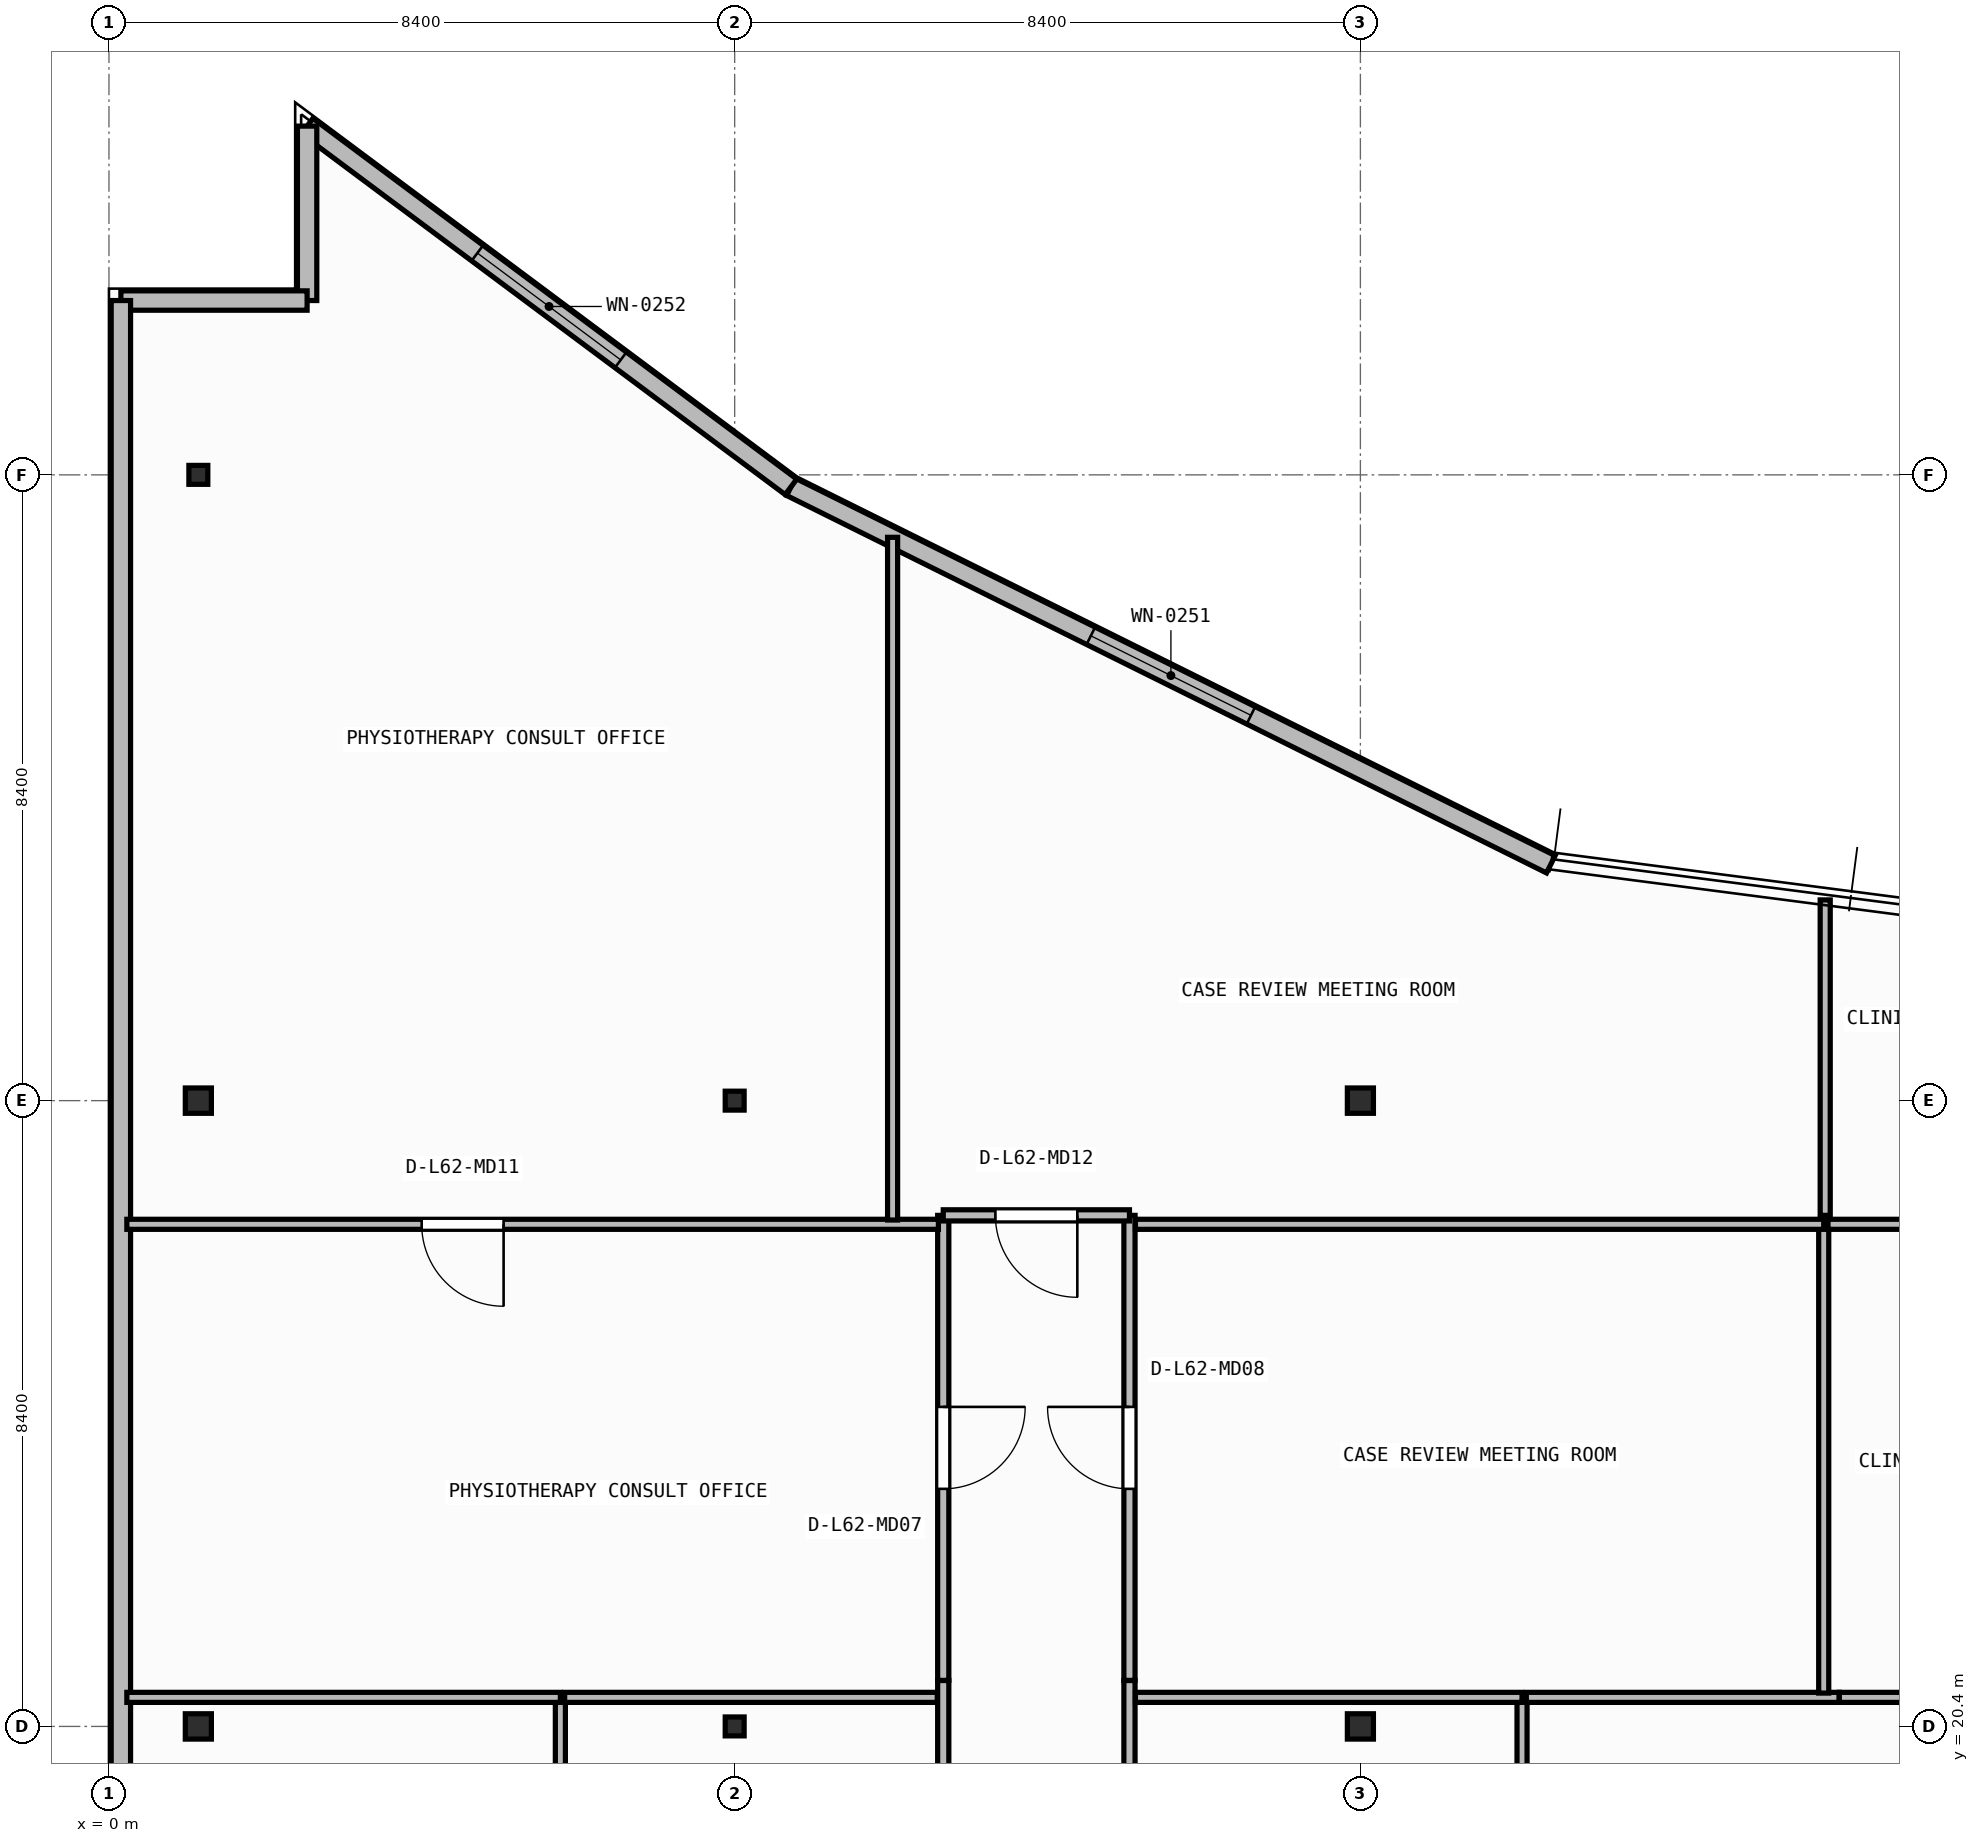
"""IFC4 building model, lengths in metres.
Left out: names, types, materials, properties, quantities, classifications, styles, units other than length and angle.
Written with IfcOpenShell. Run it as: python <this file> out.ifc"""

import sys

from ifc_helpers import new_model, si_unit, direction, frame, frame_2d, origin, origin_2d, place, context, subcontext, project, spatial, rectangle, i_section, extrude, element, fill, save


model = new_model("IFC4")
c1 = context("Model", 3, precision=1e-05, world=origin(), true_north=direction((0.0, 1.0)))
c2 = subcontext(c1, "Body", "Model", "MODEL_VIEW")
j1 = project(units=[si_unit("LENGTHUNIT", "METRE"), si_unit("PLANEANGLEUNIT", "RADIAN")], contexts=[c1])
p1 = place(None, origin())
s1 = spatial("IfcSite", under=j1, at=p1, CompositionType="ELEMENT")
p2 = place(p1, origin())
s2 = spatial("IfcBuilding", under=s1, at=p2, CompositionType="ELEMENT")
p3 = place(p2, frame((0.0, 0.0, 252.6)))
s3 = spatial("IfcBuildingStorey", under=s2, at=p3, CompositionType="ELEMENT", Elevation=252.6)
p4 = place(p3, frame((1.2, 20.4, 0.0), z_axis=(0.0, 0.0, 1.0), x_axis=(1.0, 0.0, 0.0)))
e1 = element("IfcColumn", 1, at=p4, inside=s3, PredefinedType="COLUMN", context=c2, shape_type="SweptSolid", body=[
    extrude(i_section(OverallWidth=0.35, OverallDepth=0.34, WebThickness=0.016, FlangeThickness=0.028, at=origin_2d()), origin(), (0.0, 0.0, 1.0), 3.95),
])
p5 = place(p3, frame((8.4, 20.4, 0.0), z_axis=(0.0, 0.0, 1.0), x_axis=(1.0, 0.0, 0.0)))
e2 = element("IfcColumn", 2, at=p5, inside=s3, PredefinedType="COLUMN", context=c2, shape_type="SweptSolid", body=[
    extrude(i_section(OverallWidth=0.254, OverallDepth=0.254, WebThickness=0.009, FlangeThickness=0.014, FilletRadius=0.013, at=origin_2d()), origin(), (0.0, 0.0, 1.0), 3.95),
])
for number, where, z_axis, x_axis in (
    (3, (16.8, 20.4, 0.0), (0.0, 0.0, 1.0), (1.0, 0.0, 0.0)),
    (4, (1.2, 28.8, 0.0), (0.0, 0.0, 1.0), (1.0, 0.0, 0.0)),
):
    element("IfcColumn", number, at=place(p3, frame(where, z_axis=z_axis, x_axis=x_axis)), inside=s3, PredefinedType="COLUMN", context=c2, shape_type="SweptSolid", body=[
        extrude(i_section(OverallWidth=0.35, OverallDepth=0.34, WebThickness=0.016, FlangeThickness=0.028, at=origin_2d()), origin(), (0.0, 0.0, 1.0), 3.95),
    ])
p6 = place(p3, frame((8.4, 28.8, 0.0), z_axis=(0.0, 0.0, 1.0), x_axis=(1.0, 0.0, 0.0)))
e5 = element("IfcColumn", 5, at=p6, inside=s3, PredefinedType="COLUMN", context=c2, shape_type="SweptSolid", body=[
    extrude(i_section(OverallWidth=0.254, OverallDepth=0.254, WebThickness=0.009, FlangeThickness=0.014, FilletRadius=0.013, at=origin_2d()), origin(), (0.0, 0.0, 1.0), 3.95),
])
p7 = place(p3, frame((16.8, 28.8, 0.0), z_axis=(0.0, 0.0, 1.0), x_axis=(1.0, 0.0, 0.0)))
e6 = element("IfcColumn", 6, at=p7, inside=s3, PredefinedType="COLUMN", context=c2, shape_type="SweptSolid", body=[
    extrude(i_section(OverallWidth=0.35, OverallDepth=0.34, WebThickness=0.016, FlangeThickness=0.028, at=origin_2d()), origin(), (0.0, 0.0, 1.0), 3.95),
])
p8 = place(p3, frame((1.2, 37.2, 0.0), z_axis=(0.0, 0.0, 1.0), x_axis=(1.0, 0.0, 0.0)))
e7 = element("IfcColumn", 7, at=p8, inside=s3, PredefinedType="COLUMN", context=c2, shape_type="SweptSolid", body=[
    extrude(i_section(OverallWidth=0.254, OverallDepth=0.254, WebThickness=0.009, FlangeThickness=0.014, FilletRadius=0.013, at=origin_2d()), origin(), (0.0, 0.0, 1.0), 3.95),
])
p9 = place(p3, frame((19.357, 31.973, 0.0), z_axis=(0.0, 0.0, 1.0), x_axis=(-0.895624365378, 0.444811191565, 0.0)))
e8 = element("IfcWall", 8, at=p9, inside=s3, PredefinedType="STANDARD", context=c2, shape_type="SweptSolid", body=[
    extrude(rectangle(XDim=11.389, YDim=0.26, at=frame_2d((5.695, 0.0))), origin(), (0.0, 0.0, 1.0), 3.71),
])
p10 = place(p9, frame((4.495, 0.0, 0.9)))
e9 = element("IfcOpeningElement", 9, at=p10, cuts=e8, PredefinedType="OPENING", context=c2, shape_type="SweptSolid", body=[
    extrude(rectangle(XDim=2.4, YDim=1.65, at=frame_2d((1.2, 0.825))), frame((0.0, 0.14, 0.0), z_axis=(0.0, -1.0, 0.0), x_axis=(1.0, 0.0, 0.0)), (0.0, 0.0, 1.0), 0.28),
])
p11 = place(p3, frame((9.156, 37.039, 0.0), z_axis=(0.0, 0.0, 1.0), x_axis=(-0.801775528243, 0.597625302602, 0.0)))
e10 = element("IfcWall", 10, at=p11, inside=s3, PredefinedType="STANDARD", context=c2, shape_type="SweptSolid", body=[
    extrude(rectangle(XDim=8.102, YDim=0.26, at=frame_2d((4.051, 0.0))), origin(), (0.0, 0.0, 1.0), 3.71),
])
p12 = place(p11, frame((2.851, 0.0, 0.9)))
e11 = element("IfcOpeningElement", 11, at=p12, cuts=e10, PredefinedType="OPENING", context=c2, shape_type="SweptSolid", body=[
    extrude(rectangle(XDim=2.4, YDim=1.65, at=frame_2d((1.2, 0.825))), frame((0.0, 0.14, 0.0), z_axis=(0.0, -1.0, 0.0), x_axis=(1.0, 0.0, 0.0)), (0.0, 0.0, 1.0), 0.28),
])
p13 = place(p3, frame((2.66, 41.881, 0.0), z_axis=(0.0, 0.0, 1.0), x_axis=(0.0, -1.0, 0.0)))
e12 = element("IfcWall", 12, at=p13, inside=s3, PredefinedType="STANDARD", context=c2, shape_type="SweptSolid", body=[
    extrude(rectangle(XDim=2.341, YDim=0.26, at=frame_2d((1.17, 0.0))), origin(), (0.0, 0.0, 1.0), 3.71),
])
p14 = place(p3, frame((2.66, 39.54, 0.0), z_axis=(0.0, 0.0, 1.0), x_axis=(-1.0, 0.0, 0.0)))
e13 = element("IfcWall", 13, at=p14, inside=s3, PredefinedType="STANDARD", context=c2, shape_type="SweptSolid", body=[
    extrude(rectangle(XDim=2.5, YDim=0.26, at=frame_2d((1.25, 0.0))), origin(), (0.0, 0.0, 1.0), 3.71),
])
p15 = place(p3, frame((0.16, 39.54, 0.0), z_axis=(0.0, 0.0, 1.0), x_axis=(0.0, -1.0, 0.0)))
e14 = element("IfcWall", 14, at=p15, inside=s3, PredefinedType="STANDARD", context=c2, shape_type="SweptSolid", body=[
    extrude(rectangle(XDim=36.88, YDim=0.26, at=frame_2d((18.44, 0.0))), origin(), (0.0, 0.0, 1.0), 3.71),
])
p16 = place(p15, frame((26.625, 0.0, 0.9)))
e15 = element("IfcOpeningElement", 15, at=p16, cuts=e14, PredefinedType="OPENING", context=c2, shape_type="SweptSolid", body=[
    extrude(rectangle(XDim=2.4, YDim=1.65, at=frame_2d((1.2, 0.825))), frame((0.0, 0.14, 0.0), z_axis=(0.0, -1.0, 0.0), x_axis=(1.0, 0.0, 0.0)), (0.0, 0.0, 1.0), 0.28),
])
for number, where, z_axis, x_axis in (
    (16, (11.2, 21.016, 0.0), (0.0, 0.0, 1.0), (0.0, -1.0, 0.0)),
    (17, (13.7, 14.7, 0.0), (0.0, 0.0, 1.0), (0.0, 1.0, 0.0)),
):
    element("IfcWall", number, at=place(p3, frame(where, z_axis=z_axis, x_axis=x_axis)), inside=s3, PredefinedType="PARTITIONING", context=c2, shape_type="SweptSolid", body=[
        extrude(rectangle(XDim=6.316, YDim=0.15, at=frame_2d((3.158, 0.0))), origin(), (0.0, 0.0, 1.0), 3.71),
    ])
p17 = place(p3, frame((11.2, 27.26, 0.0), z_axis=(0.0, 0.0, 1.0), x_axis=(0.0, -1.0, 0.0)))
e18 = element("IfcWall", 18, at=p17, inside=s3, PredefinedType="PARTITIONING", context=c2, shape_type="SweptSolid", body=[
    extrude(rectangle(XDim=6.242, YDim=0.15, at=frame_2d((3.121, 0.0))), origin(), (0.0, 0.0, 1.0), 3.71),
])
p18 = place(p17, frame((2.571, 0.0, 0.0)))
e19 = element("IfcOpeningElement", 19, at=p18, cuts=e18, PredefinedType="OPENING", context=c2, shape_type="SweptSolid", body=[
    extrude(rectangle(XDim=1.1, YDim=2.1, at=frame_2d((0.55, 1.05))), frame((0.0, 0.085, 0.0), z_axis=(0.0, -1.0, 0.0), x_axis=(1.0, 0.0, 0.0)), (0.0, 0.0, 1.0), 0.17),
])
p19 = place(p3, frame((13.7, 21.018, 0.0), z_axis=(0.0, 0.0, 1.0), x_axis=(0.0, 1.0, 0.0)))
e20 = element("IfcWall", 20, at=p19, inside=s3, PredefinedType="PARTITIONING", context=c2, shape_type="SweptSolid", body=[
    extrude(rectangle(XDim=6.242, YDim=0.15, at=frame_2d((3.121, 0.0))), origin(), (0.0, 0.0, 1.0), 3.71),
])
p20 = place(p19, frame((2.571, 0.0, 0.0)))
e21 = element("IfcOpeningElement", 21, at=p20, cuts=e20, PredefinedType="OPENING", context=c2, shape_type="SweptSolid", body=[
    extrude(rectangle(XDim=1.1, YDim=2.1, at=frame_2d((0.55, 1.05))), frame((0.0, 0.085, 0.0), z_axis=(0.0, -1.0, 0.0), x_axis=(1.0, 0.0, 0.0)), (0.0, 0.0, 1.0), 0.17),
])
p21 = place(p3, frame((13.7, 27.26, 0.0), z_axis=(0.0, 0.0, 1.0), x_axis=(-1.0, 0.0, 0.0)))
e22 = element("IfcWall", 22, at=p21, inside=s3, PredefinedType="PARTITIONING", context=c2, shape_type="SweptSolid", body=[
    extrude(rectangle(XDim=2.5, YDim=0.15, at=frame_2d((1.25, 0.0))), origin(), (0.0, 0.0, 1.0), 3.71),
])
p22 = place(p21, frame((0.7, 0.0, 0.0)))
e23 = element("IfcOpeningElement", 23, at=p22, cuts=e22, PredefinedType="OPENING", context=c2, shape_type="SweptSolid", body=[
    extrude(rectangle(XDim=1.1, YDim=2.1, at=frame_2d((0.55, 1.05))), frame((0.0, 0.085, 0.0), z_axis=(0.0, -1.0, 0.0), x_axis=(1.0, 0.0, 0.0)), (0.0, 0.0, 1.0), 0.17),
])
p23 = place(p3, frame((6.06, 17.14, 0.0), z_axis=(0.0, 0.0, 1.0), x_axis=(0.0, 1.0, 0.0)))
e24 = element("IfcWall", 24, at=p23, inside=s3, PredefinedType="PARTITIONING", context=c2, shape_type="SweptSolid", body=[
    extrude(rectangle(XDim=3.65, YDim=0.135, at=frame_2d((1.825, 0.0))), origin(), (0.0, 0.0, 1.0), 3.71),
])
p24 = place(p3, frame((6.06, 20.79, 0.0), z_axis=(0.0, 0.0, 1.0), x_axis=(-1.0, 0.0, 0.0)))
e25 = element("IfcWall", 25, at=p24, inside=s3, PredefinedType="PARTITIONING", context=c2, shape_type="SweptSolid", body=[
    extrude(rectangle(XDim=5.82, YDim=0.135, at=frame_2d((2.91, 0.0))), origin(), (0.0, 0.0, 1.0), 3.157),
])
p25 = place(p3, frame((11.12, 20.79, 0.0), z_axis=(0.0, 0.0, 1.0), x_axis=(-1.0, 0.0, 0.0)))
e26 = element("IfcWall", 26, at=p25, inside=s3, PredefinedType="PARTITIONING", context=c2, shape_type="SweptSolid", body=[
    extrude(rectangle(XDim=5.003, YDim=0.135, at=frame_2d((2.501, 0.0))), origin(), (0.0, 0.0, 1.0), 3.157),
])
p26 = place(p3, frame((18.97, 14.76, 0.0), z_axis=(0.0, 0.0, 1.0), x_axis=(0.0, 1.0, 0.0)))
e27 = element("IfcWall", 27, at=p26, inside=s3, PredefinedType="PARTITIONING", context=c2, shape_type="SweptSolid", body=[
    extrude(rectangle(XDim=6.03, YDim=0.135, at=frame_2d((3.015, 0.0))), origin(), (0.0, 0.0, 1.0), 3.71),
])
p27 = place(p3, frame((18.97, 20.79, 0.0), z_axis=(0.0, 0.0, 1.0), x_axis=(-1.0, 0.0, 0.0)))
e28 = element("IfcWall", 28, at=p27, inside=s3, PredefinedType="PARTITIONING", context=c2, shape_type="SweptSolid", body=[
    extrude(rectangle(XDim=5.19, YDim=0.135, at=frame_2d((2.595, 0.0))), origin(), (0.0, 0.0, 1.0), 3.157),
])
p28 = place(p3, frame((23.228, 20.79, 0.0), z_axis=(0.0, 0.0, 1.0), x_axis=(-1.0, 0.0, 0.0)))
e29 = element("IfcWall", 29, at=p28, inside=s3, PredefinedType="PARTITIONING", context=c2, shape_type="SweptSolid", body=[
    extrude(rectangle(XDim=4.2, YDim=0.135, at=frame_2d((2.1, 0.0))), origin(), (0.0, 0.0, 1.0), 3.157),
])
p29 = place(p3, frame((25.76, 20.79, 0.0), z_axis=(0.0, 0.0, 1.0), x_axis=(-1.0, 0.0, 0.0)))
e30 = element("IfcWall", 30, at=p29, inside=s3, PredefinedType="PARTITIONING", context=c2, shape_type="SweptSolid", body=[
    extrude(rectangle(XDim=2.531, YDim=0.135, at=frame_2d((1.265, 0.0))), origin(), (0.0, 0.0, 1.0), 3.157),
])
p30 = place(p3, frame((11.135, 27.14, 0.0), z_axis=(0.0, 0.0, 1.0), x_axis=(-1.0, 0.0, 0.0)))
e31 = element("IfcWall", 31, at=p30, inside=s3, PredefinedType="PARTITIONING", context=c2, shape_type="SweptSolid", body=[
    extrude(rectangle(XDim=10.895, YDim=0.135, at=frame_2d((5.448, 0.0))), origin(), (0.0, 0.0, 1.0), 3.71),
])
p31 = place(p30, frame((5.837, 0.0, 0.0)))
e32 = element("IfcOpeningElement", 32, at=p31, cuts=e31, PredefinedType="OPENING", context=c2, shape_type="SweptSolid", body=[
    extrude(rectangle(XDim=1.1, YDim=2.1, at=frame_2d((0.55, 1.05))), frame((0.0, 0.077, 0.0), z_axis=(0.0, -1.0, 0.0), x_axis=(1.0, 0.0, 0.0)), (0.0, 0.0, 1.0), 0.155),
])
p32 = place(p3, frame((23.02, 20.847, 0.0), z_axis=(0.0, 0.0, 1.0), x_axis=(0.0, 1.0, 0.0)))
e33 = element("IfcWall", 33, at=p32, inside=s3, PredefinedType="PARTITIONING", context=c2, shape_type="SweptSolid", body=[
    extrude(rectangle(XDim=6.292, YDim=0.135, at=frame_2d((3.146, 0.0))), origin(), (0.0, 0.0, 1.0), 3.71),
])
p33 = place(p3, frame((23.02, 27.14, 0.0), z_axis=(0.0, 0.0, 1.0), x_axis=(-1.0, 0.0, 0.0)))
e34 = element("IfcWall", 34, at=p33, inside=s3, PredefinedType="PARTITIONING", context=c2, shape_type="SweptSolid", body=[
    extrude(rectangle(XDim=9.24, YDim=0.135, at=frame_2d((4.62, 0.0))), origin(), (0.0, 0.0, 1.0), 3.71),
])
p34 = place(p3, frame((33.86, 27.14, 0.0), z_axis=(0.0, 0.0, 1.0), x_axis=(-1.0, 0.0, 0.0)))
e35 = element("IfcWall", 35, at=p34, inside=s3, PredefinedType="PARTITIONING", context=c2, shape_type="SweptSolid", body=[
    extrude(rectangle(XDim=10.783, YDim=0.135, at=frame_2d((5.391, 0.0))), origin(), (0.0, 0.0, 1.0), 3.71),
])
p35 = place(p34, frame((3.913, 0.0, 0.0)))
e36 = element("IfcOpeningElement", 36, at=p35, cuts=e35, PredefinedType="OPENING", context=c2, shape_type="SweptSolid", body=[
    extrude(rectangle(XDim=1.1, YDim=2.1, at=frame_2d((0.55, 1.05))), frame((0.0, 0.077, 0.0), z_axis=(0.0, -1.0, 0.0), x_axis=(1.0, 0.0, 0.0)), (0.0, 0.0, 1.0), 0.155),
])
p36 = place(p3, frame((10.52, 27.198, 0.0), z_axis=(0.0, 0.0, 1.0), x_axis=(0.0, 1.0, 0.0)))
e37 = element("IfcWall", 37, at=p36, inside=s3, PredefinedType="PARTITIONING", context=c2, shape_type="SweptSolid", body=[
    extrude(rectangle(XDim=9.164, YDim=0.135, at=frame_2d((4.582, 0.0))), origin(), (0.0, 0.0, 1.0), 3.71),
])
p37 = place(p3, frame((23.04, 27.26, 0.0), z_axis=(0.0, 0.0, 1.0), x_axis=(0.0, 1.0, 0.0)))
e38 = element("IfcWall", 38, at=p37, inside=s3, PredefinedType="PARTITIONING", context=c2, shape_type="SweptSolid", body=[
    extrude(rectangle(XDim=4.234, YDim=0.135, at=frame_2d((2.117, 0.0))), origin(), (0.0, 0.0, 1.0), 3.71),
])
p38 = place(p10, origin())
e39 = element("IfcWindow", 39, at=p38, inside=s3, PartitioningType="SINGLE_PANEL", PredefinedType="WINDOW", context=c2, shape_type="SweptSolid", body=[
    extrude(rectangle(XDim=2.4, YDim=1.65, at=frame_2d((1.2, 0.825))), frame((0.0, 0.03, 0.0), z_axis=(0.0, -1.0, 0.0), x_axis=(1.0, 0.0, 0.0)), (0.0, 0.0, 1.0), 0.06),
])
fill(e9, e39)
p39 = place(p12, origin())
e40 = element("IfcWindow", 40, at=p39, inside=s3, PartitioningType="SINGLE_PANEL", PredefinedType="WINDOW", context=c2, shape_type="SweptSolid", body=[
    extrude(rectangle(XDim=2.4, YDim=1.65, at=frame_2d((1.2, 0.825))), frame((0.0, 0.03, 0.0), z_axis=(0.0, -1.0, 0.0), x_axis=(1.0, 0.0, 0.0)), (0.0, 0.0, 1.0), 0.06),
])
fill(e11, e40)
p40 = place(p18, origin())
e41 = element("IfcDoor", 41, at=p40, inside=s3, OperationType="SINGLE_SWING_LEFT", PredefinedType="DOOR", context=c2, shape_type="SweptSolid", body=[
    extrude(rectangle(XDim=1.1, YDim=2.1, at=frame_2d((0.55, 1.05))), frame((0.0, 0.025, 0.0), z_axis=(0.0, -1.0, 0.0), x_axis=(1.0, 0.0, 0.0)), (0.0, 0.0, 1.0), 0.05),
])
fill(e19, e41)
p41 = place(p20, origin())
e42 = element("IfcDoor", 42, at=p41, inside=s3, OperationType="SINGLE_SWING_RIGHT", PredefinedType="DOOR", context=c2, shape_type="SweptSolid", body=[
    extrude(rectangle(XDim=1.1, YDim=2.1, at=frame_2d((0.55, 1.05))), frame((0.0, 0.025, 0.0), z_axis=(0.0, -1.0, 0.0), x_axis=(1.0, 0.0, 0.0)), (0.0, 0.0, 1.0), 0.05),
])
fill(e21, e42)
p42 = place(p22, origin())
e43 = element("IfcDoor", 43, at=p42, inside=s3, OperationType="SINGLE_SWING_LEFT", PredefinedType="DOOR", context=c2, shape_type="SweptSolid", body=[
    extrude(rectangle(XDim=1.1, YDim=2.1, at=frame_2d((0.55, 1.05))), frame((0.0, 0.025, 0.0), z_axis=(0.0, -1.0, 0.0), x_axis=(1.0, 0.0, 0.0)), (0.0, 0.0, 1.0), 0.05),
])
fill(e23, e43)
p43 = place(p31, origin())
e44 = element("IfcDoor", 44, at=p43, inside=s3, OperationType="SINGLE_SWING_LEFT", PredefinedType="DOOR", context=c2, shape_type="SweptSolid", body=[
    extrude(rectangle(XDim=1.1, YDim=2.1, at=frame_2d((0.55, 1.05))), frame((0.0, 0.025, 0.0), z_axis=(0.0, -1.0, 0.0), x_axis=(1.0, 0.0, 0.0)), (0.0, 0.0, 1.0), 0.05),
])
fill(e32, e44)
save(model, sys.argv[1])
